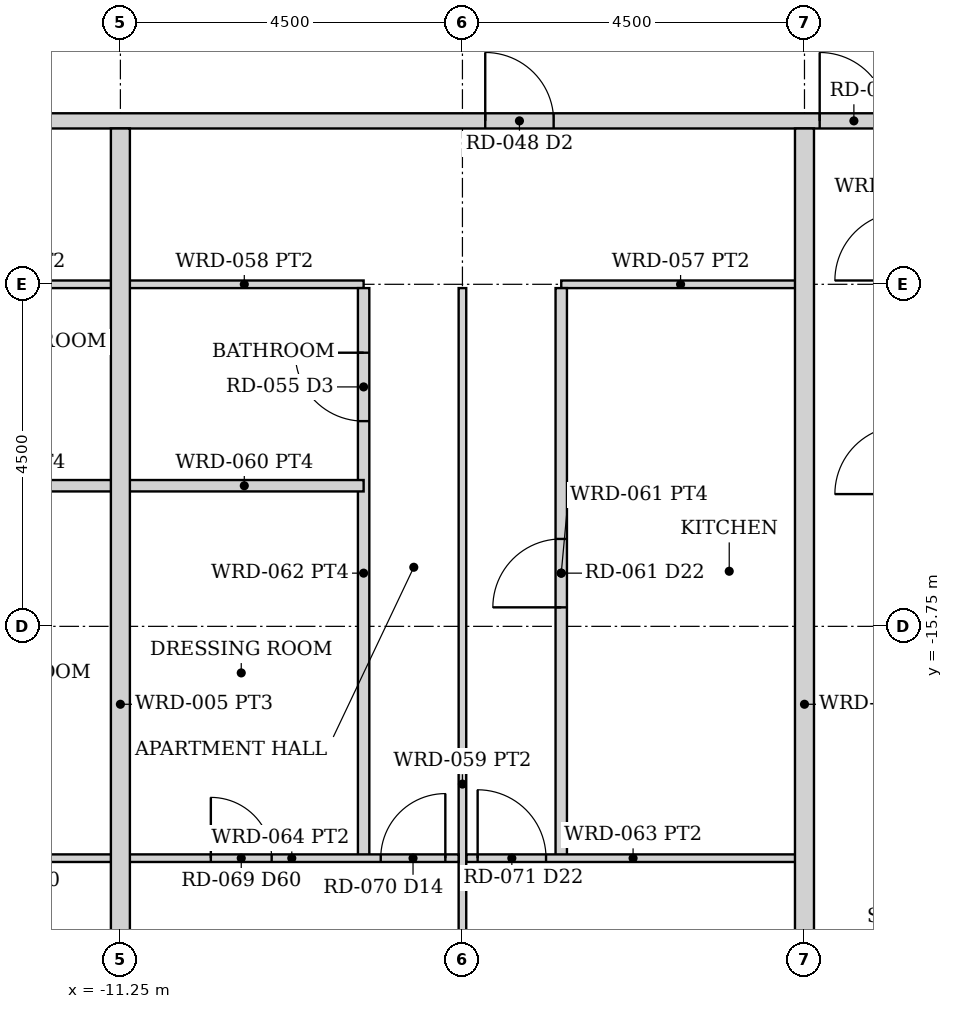
"""IFC4 building model, lengths in metres.
Left out: names, types, materials, properties, quantities, classifications, styles, units other than length and angle.
Written with IfcOpenShell. Run it as: python <this file> out.ifc"""

import sys

from ifc_helpers import new_model, si_unit, direction, frame, frame_2d, origin, place, context, subcontext, project, spatial, rectangle, extrude, element, fill, save


model = new_model("IFC4")
c1 = context("Model", 3, precision=1e-05, world=origin(), true_north=direction((0.0, 1.0)))
c2 = subcontext(c1, "Body", "Model", "MODEL_VIEW")
j1 = project(units=[si_unit("LENGTHUNIT", "METRE"), si_unit("PLANEANGLEUNIT", "RADIAN")], contexts=[c1])
p1 = place(None, origin())
s1 = spatial("IfcSite", under=j1, at=p1, CompositionType="ELEMENT")
p2 = place(p1, origin())
s2 = spatial("IfcBuilding", under=s1, at=p2, CompositionType="ELEMENT")
p3 = place(p2, frame((0.0, 0.0, 58.0)))
s3 = spatial("IfcBuildingStorey", under=s2, at=p3, CompositionType="ELEMENT", Elevation=58.0)
p4 = place(p3, frame((-24.55, -9.1, 0.0), z_axis=(0.0, 0.0, 1.0), x_axis=(1.0, 0.0, 0.0)))
e1 = element("IfcWall", 1, at=p4, inside=s3, PredefinedType="PARTITIONING", context=c2, shape_type="SweptSolid", body=[
    extrude(rectangle(XDim=49.1, YDim=0.2, at=frame_2d((24.55, 0.0))), origin(), (0.0, 0.0, 1.0), 2.373),
])
p5 = place(p4, frame((5.1, 0.0, 0.0)))
e2 = element("IfcOpeningElement", 2, at=p5, cuts=e1, PredefinedType="OPENING", context=c2, shape_type="SweptSolid", body=[
    extrude(rectangle(XDim=0.9, YDim=2.1, at=frame_2d((0.45, 1.05))), frame((0.0, 0.11, 0.0), z_axis=(0.0, -1.0, 0.0), x_axis=(1.0, 0.0, 0.0)), (0.0, 0.0, 1.0), 0.22),
])
p6 = place(p4, frame((18.1, 0.0, 0.0)))
e3 = element("IfcOpeningElement", 3, at=p6, cuts=e1, PredefinedType="OPENING", context=c2, shape_type="SweptSolid", body=[
    extrude(rectangle(XDim=0.9, YDim=2.1, at=frame_2d((0.45, 1.05))), frame((0.0, 0.11, 0.0), z_axis=(0.0, -1.0, 0.0), x_axis=(1.0, 0.0, 0.0)), (0.0, 0.0, 1.0), 0.22),
])
p7 = place(p4, frame((22.5, 0.0, 0.0)))
e4 = element("IfcOpeningElement", 4, at=p7, cuts=e1, PredefinedType="OPENING", context=c2, shape_type="SweptSolid", body=[
    extrude(rectangle(XDim=0.9, YDim=2.1, at=frame_2d((0.45, 1.05))), frame((0.0, 0.11, 0.0), z_axis=(0.0, -1.0, 0.0), x_axis=(1.0, 0.0, 0.0)), (0.0, 0.0, 1.0), 0.22),
])
p8 = place(p4, frame((27.1, 0.0, 0.0)))
e5 = element("IfcOpeningElement", 5, at=p8, cuts=e1, PredefinedType="OPENING", context=c2, shape_type="SweptSolid", body=[
    extrude(rectangle(XDim=0.9, YDim=2.1, at=frame_2d((0.45, 1.05))), frame((0.0, 0.11, 0.0), z_axis=(0.0, -1.0, 0.0), x_axis=(1.0, 0.0, 0.0)), (0.0, 0.0, 1.0), 0.22),
])
p9 = place(p4, frame((43.1, 0.0, 0.0)))
e6 = element("IfcOpeningElement", 6, at=p9, cuts=e1, PredefinedType="OPENING", context=c2, shape_type="SweptSolid", body=[
    extrude(rectangle(XDim=0.9, YDim=2.1, at=frame_2d((0.45, 1.05))), frame((0.0, 0.11, 0.0), z_axis=(0.0, -1.0, 0.0), x_axis=(1.0, 0.0, 0.0)), (0.0, 0.0, 1.0), 0.22),
])
p10 = place(p3, frame((-14.45, -11.25, 0.0), z_axis=(0.0, 0.0, 1.0), x_axis=(1.0, 0.0, 0.0)))
e7 = element("IfcWall", 7, at=p10, inside=s3, PredefinedType="PARTITIONING", context=c2, shape_type="SweptSolid", body=[
    extrude(rectangle(XDim=3.14, YDim=0.1, at=frame_2d((1.57, 0.0))), origin(), (0.0, 0.0, 1.0), 2.373),
])
p11 = place(p3, frame((-15.7, -18.8, 0.0), z_axis=(0.0, 0.0, 1.0), x_axis=(1.0, 0.0, 0.0)))
e8 = element("IfcWall", 8, at=p11, inside=s3, PredefinedType="PARTITIONING", context=c2, shape_type="SweptSolid", body=[
    extrude(rectangle(XDim=4.39, YDim=0.1, at=frame_2d((2.195, 0.0))), origin(), (0.0, 0.0, 1.0), 2.373),
])
p12 = place(p11, frame((0.175, 0.0, 0.0)))
e9 = element("IfcOpeningElement", 9, at=p12, cuts=e8, PredefinedType="OPENING", context=c2, shape_type="SweptSolid", body=[
    extrude(rectangle(XDim=0.85, YDim=2.1, at=frame_2d((0.425, 1.05))), frame((0.0, 0.06, 0.0), z_axis=(0.0, -1.0, 0.0), x_axis=(1.0, 0.0, 0.0)), (0.0, 0.0, 1.0), 0.12),
])
p13 = place(p11, frame((2.46, 0.0, 0.0)))
e10 = element("IfcOpeningElement", 10, at=p13, cuts=e8, PredefinedType="OPENING", context=c2, shape_type="SweptSolid", body=[
    extrude(rectangle(XDim=0.8, YDim=2.1, at=frame_2d((0.4, 1.05))), frame((0.0, 0.06, 0.0), z_axis=(0.0, -1.0, 0.0), x_axis=(1.0, 0.0, 0.0)), (0.0, 0.0, 1.0), 0.12),
])
p14 = place(p3, frame((-14.45, -13.9, 0.0), z_axis=(0.0, 0.0, 1.0), x_axis=(1.0, 0.0, 0.0)))
e11 = element("IfcWall", 11, at=p14, inside=s3, PredefinedType="PARTITIONING", context=c2, shape_type="SweptSolid", body=[
    extrude(rectangle(XDim=3.14, YDim=0.15, at=frame_2d((1.57, 0.0))), origin(), (0.0, 0.0, 1.0), 2.373),
])
p15 = place(p3, frame((-5.45, -11.25, 0.0), z_axis=(0.0, 0.0, 1.0), x_axis=(1.0, 0.0, 0.0)))
e12 = element("IfcWall", 12, at=p15, inside=s3, PredefinedType="PARTITIONING", context=c2, shape_type="SweptSolid", body=[
    extrude(rectangle(XDim=3.14, YDim=0.1, at=frame_2d((1.57, 0.0))), origin(), (0.0, 0.0, 1.0), 2.373),
])
p16 = place(p3, frame((-5.45, -18.8, 0.0), z_axis=(0.0, 0.0, 1.0), x_axis=(0.0, 1.0, 0.0)))
e13 = element("IfcWall", 13, at=p16, inside=s3, PredefinedType="PARTITIONING", context=c2, shape_type="SweptSolid", body=[
    extrude(rectangle(XDim=7.5, YDim=0.15, at=frame_2d((3.75, 0.0))), origin(), (0.0, 0.0, 1.0), 2.373),
])
p17 = place(p16, frame((3.3, 0.0, 0.0)))
e14 = element("IfcOpeningElement", 14, at=p17, cuts=e13, PredefinedType="OPENING", context=c2, shape_type="SweptSolid", body=[
    extrude(rectangle(XDim=0.9, YDim=2.1, at=frame_2d((0.45, 1.05))), frame((0.0, 0.085, 0.0), z_axis=(0.0, -1.0, 0.0), x_axis=(1.0, 0.0, 0.0)), (0.0, 0.0, 1.0), 0.17),
])
p18 = place(p3, frame((-6.7, -18.8, 0.0), z_axis=(0.0, 0.0, 1.0), x_axis=(1.0, 0.0, 0.0)))
e15 = element("IfcWall", 15, at=p18, inside=s3, PredefinedType="PARTITIONING", context=c2, shape_type="SweptSolid", body=[
    extrude(rectangle(XDim=4.39, YDim=0.1, at=frame_2d((2.195, 0.0))), origin(), (0.0, 0.0, 1.0), 2.373),
])
p19 = place(p18, frame((0.15, 0.0, 0.0)))
e16 = element("IfcOpeningElement", 16, at=p19, cuts=e15, PredefinedType="OPENING", context=c2, shape_type="SweptSolid", body=[
    extrude(rectangle(XDim=0.9, YDim=2.1, at=frame_2d((0.45, 1.05))), frame((0.0, 0.06, 0.0), z_axis=(0.0, -1.0, 0.0), x_axis=(1.0, 0.0, 0.0)), (0.0, 0.0, 1.0), 0.12),
])
p20 = place(p3, frame((-6.75, -24.35, 0.0), z_axis=(0.0, 0.0, 1.0), x_axis=(0.0, 1.0, 0.0)))
e17 = element("IfcWall", 17, at=p20, inside=s3, PredefinedType="PARTITIONING", context=c2, shape_type="SweptSolid", body=[
    extrude(rectangle(XDim=13.05, YDim=0.1, at=frame_2d((6.525, 0.0))), origin(), (0.0, 0.0, 1.0), 2.373),
])
p21 = place(p3, frame((-11.19, -11.25, 0.0), z_axis=(0.0, 0.0, 1.0), x_axis=(1.0, 0.0, 0.0)))
e18 = element("IfcWall", 18, at=p21, inside=s3, PredefinedType="PARTITIONING", context=c2, shape_type="SweptSolid", body=[
    extrude(rectangle(XDim=3.14, YDim=0.1, at=frame_2d((1.57, 0.0))), origin(), (0.0, 0.0, 1.0), 2.373),
])
p22 = place(p3, frame((-8.05, -18.8, 0.0), z_axis=(0.0, 0.0, 1.0), x_axis=(0.0, 1.0, 0.0)))
e19 = element("IfcWall", 19, at=p22, inside=s3, PredefinedType="PARTITIONING", context=c2, shape_type="SweptSolid", body=[
    extrude(rectangle(XDim=7.5, YDim=0.15, at=frame_2d((3.75, 0.0))), origin(), (0.0, 0.0, 1.0), 2.373),
])
p23 = place(p22, frame((5.75, 0.0, 0.0)))
e20 = element("IfcOpeningElement", 20, at=p23, cuts=e19, PredefinedType="OPENING", context=c2, shape_type="SweptSolid", body=[
    extrude(rectangle(XDim=0.9, YDim=2.1, at=frame_2d((0.45, 1.05))), frame((0.0, 0.085, 0.0), z_axis=(0.0, -1.0, 0.0), x_axis=(1.0, 0.0, 0.0)), (0.0, 0.0, 1.0), 0.17),
])
p24 = place(p3, frame((-11.19, -18.8, 0.0), z_axis=(0.0, 0.0, 1.0), x_axis=(1.0, 0.0, 0.0)))
e21 = element("IfcWall", 21, at=p24, inside=s3, PredefinedType="PARTITIONING", context=c2, shape_type="SweptSolid", body=[
    extrude(rectangle(XDim=4.39, YDim=0.1, at=frame_2d((2.195, 0.0))), origin(), (0.0, 0.0, 1.0), 2.373),
])
p25 = place(p24, frame((3.365, 0.0, 0.0)))
e22 = element("IfcOpeningElement", 22, at=p25, cuts=e21, PredefinedType="OPENING", context=c2, shape_type="SweptSolid", body=[
    extrude(rectangle(XDim=0.85, YDim=2.1, at=frame_2d((0.425, 1.05))), frame((0.0, 0.06, 0.0), z_axis=(0.0, -1.0, 0.0), x_axis=(1.0, 0.0, 0.0)), (0.0, 0.0, 1.0), 0.12),
])
p26 = place(p24, frame((1.13, 0.0, 0.0)))
e23 = element("IfcOpeningElement", 23, at=p26, cuts=e21, PredefinedType="OPENING", context=c2, shape_type="SweptSolid", body=[
    extrude(rectangle(XDim=0.8, YDim=2.1, at=frame_2d((0.4, 1.05))), frame((0.0, 0.06, 0.0), z_axis=(0.0, -1.0, 0.0), x_axis=(1.0, 0.0, 0.0)), (0.0, 0.0, 1.0), 0.12),
])
p27 = place(p3, frame((-11.19, -13.9, 0.0), z_axis=(0.0, 0.0, 1.0), x_axis=(1.0, 0.0, 0.0)))
e24 = element("IfcWall", 24, at=p27, inside=s3, PredefinedType="PARTITIONING", context=c2, shape_type="SweptSolid", body=[
    extrude(rectangle(XDim=3.14, YDim=0.15, at=frame_2d((1.57, 0.0))), origin(), (0.0, 0.0, 1.0), 2.373),
])
for number, where, z_axis, x_axis in (
    (25, (-11.25, -24.35, 0.0), (0.0, 0.0, 1.0), (0.0, 1.0, 0.0)),
    (26, (-2.25, -24.35, 0.0), (0.0, 0.0, 1.0), (0.0, 1.0, 0.0)),
):
    element("IfcWall", number, at=place(p3, frame(where, z_axis=z_axis, x_axis=x_axis)), inside=s3, PredefinedType="PARTITIONING", context=c2, shape_type="SweptSolid", body=[
        extrude(rectangle(XDim=15.15, YDim=0.25, at=frame_2d((7.575, 0.0))), origin(), (0.0, 0.0, 1.0), 2.373),
    ])
p28 = place(p6, origin())
e27 = element("IfcDoor", 27, at=p28, inside=s3, OperationType="SINGLE_SWING_LEFT", PredefinedType="DOOR", context=c2, shape_type="SweptSolid", body=[
    extrude(rectangle(XDim=0.9, YDim=2.1, at=frame_2d((0.45, 1.05))), frame((0.0, 0.025, 0.0), z_axis=(0.0, -1.0, 0.0), x_axis=(1.0, 0.0, 0.0)), (0.0, 0.0, 1.0), 0.05),
])
fill(e3, e27)
p29 = place(p17, origin())
e28 = element("IfcDoor", 28, at=p29, inside=s3, OperationType="SINGLE_SWING_LEFT", PredefinedType="DOOR", context=c2, shape_type="SweptSolid", body=[
    extrude(rectangle(XDim=0.9, YDim=2.1, at=frame_2d((0.45, 1.05))), frame((0.0, 0.025, 0.0), z_axis=(0.0, -1.0, 0.0), x_axis=(1.0, 0.0, 0.0)), (0.0, 0.0, 1.0), 0.05),
])
fill(e14, e28)
p30 = place(p19, origin())
e29 = element("IfcDoor", 29, at=p30, inside=s3, OperationType="SINGLE_SWING_LEFT", PredefinedType="DOOR", context=c2, shape_type="SweptSolid", body=[
    extrude(rectangle(XDim=0.9, YDim=2.1, at=frame_2d((0.45, 1.05))), frame((0.0, 0.025, 0.0), z_axis=(0.0, -1.0, 0.0), x_axis=(1.0, 0.0, 0.0)), (0.0, 0.0, 1.0), 0.05),
])
fill(e16, e29)
p31 = place(p25, origin())
e30 = element("IfcDoor", 30, at=p31, inside=s3, OperationType="SINGLE_SWING_RIGHT", PredefinedType="DOOR", context=c2, shape_type="SweptSolid", body=[
    extrude(rectangle(XDim=0.85, YDim=2.1, at=frame_2d((0.425, 1.05))), frame((0.0, 0.025, 0.0), z_axis=(0.0, -1.0, 0.0), x_axis=(1.0, 0.0, 0.0)), (0.0, 0.0, 1.0), 0.05),
])
fill(e22, e30)
p32 = place(p23, origin())
e31 = element("IfcDoor", 31, at=p32, inside=s3, OperationType="SINGLE_SWING_RIGHT", PredefinedType="DOOR", context=c2, shape_type="SweptSolid", body=[
    extrude(rectangle(XDim=0.9, YDim=2.1, at=frame_2d((0.45, 1.05))), frame((0.0, 0.025, 0.0), z_axis=(0.0, -1.0, 0.0), x_axis=(1.0, 0.0, 0.0)), (0.0, 0.0, 1.0), 0.05),
])
fill(e20, e31)
p33 = place(p26, origin())
e32 = element("IfcDoor", 32, at=p33, inside=s3, OperationType="SINGLE_SWING_LEFT", PredefinedType="DOOR", context=c2, shape_type="SweptSolid", body=[
    extrude(rectangle(XDim=0.8, YDim=2.1, at=frame_2d((0.4, 1.05))), frame((0.0, 0.025, 0.0), z_axis=(0.0, -1.0, 0.0), x_axis=(1.0, 0.0, 0.0)), (0.0, 0.0, 1.0), 0.05),
])
fill(e23, e32)
p34 = place(p7, origin())
e33 = element("IfcDoor", 33, at=p34, inside=s3, OperationType="SINGLE_SWING_LEFT", PredefinedType="DOOR", context=c2, shape_type="SweptSolid", body=[
    extrude(rectangle(XDim=0.9, YDim=2.1, at=frame_2d((0.45, 1.05))), frame((0.0, 0.025, 0.0), z_axis=(0.0, -1.0, 0.0), x_axis=(1.0, 0.0, 0.0)), (0.0, 0.0, 1.0), 0.05),
])
fill(e4, e33)
save(model, sys.argv[1])
